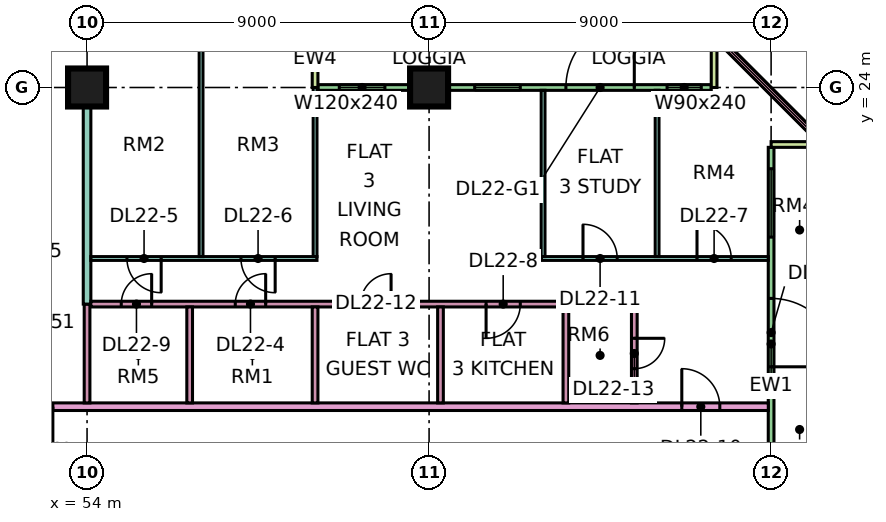
"""IFC4 building model, lengths in metres.
Left out: names, types, materials, properties, quantities, classifications, styles, units other than length and angle.
Written with IfcOpenShell. Run it as: python <this file> out.ifc"""

import sys

from ifc_helpers import new_model, si_unit, direction, frame, frame_2d, origin, origin_2d, place, context, subcontext, project, spatial, rectangle, extrude, element, fill, save


model = new_model("IFC4")
c1 = context("Model", 3, precision=1e-05, world=origin(), true_north=direction((0.0, 1.0)))
c2 = subcontext(c1, "Body", "Model", "MODEL_VIEW")
j1 = project(units=[si_unit("LENGTHUNIT", "METRE"), si_unit("PLANEANGLEUNIT", "RADIAN")], contexts=[c1])
p1 = place(None, origin())
s1 = spatial("IfcSite", under=j1, at=p1, CompositionType="ELEMENT")
p2 = place(p1, origin())
s2 = spatial("IfcBuilding", under=s1, at=p2, CompositionType="ELEMENT")
p3 = place(p2, frame((0.0, 0.0, 99.4)))
s3 = spatial("IfcBuildingStorey", under=s2, at=p3, CompositionType="ELEMENT", Elevation=99.4)
for number, where, z_axis, x_axis in (
    (1, (54.0, 24.0, 0.0), (0.0, 0.0, 1.0), (1.0, 0.0, 0.0)),
    (2, (63.0, 24.0, 0.0), (0.0, 0.0, 1.0), (1.0, 0.0, 0.0)),
):
    element("IfcColumn", number, at=place(p3, frame(where, z_axis=z_axis, x_axis=x_axis)), inside=s3, PredefinedType="COLUMN", context=c2, shape_type="SweptSolid", body=[
        extrude(rectangle(XDim=1.0, YDim=1.0, at=origin_2d()), origin(), (0.0, 0.0, 1.0), 3.75),
    ])
p4 = place(p3, frame((70.425, 24.0, 0.0), z_axis=(0.0, 0.0, 1.0), x_axis=(-1.0, 0.0, 0.0)))
e3 = element("IfcWall", 3, at=p4, inside=s3, PredefinedType="SOLIDWALL", context=c2, shape_type="SweptSolid", body=[
    extrude(rectangle(XDim=10.35, YDim=0.15, at=frame_2d((5.175, 0.0))), origin(), (0.0, 0.0, 1.0), 3.35),
])
p5 = place(p4, frame((0.262, 0.0, 0.45)))
e4 = element("IfcOpeningElement", 4, at=p5, cuts=e3, PredefinedType="OPENING", context=c2, shape_type="SweptSolid", body=[
    extrude(rectangle(XDim=0.9, YDim=2.4, at=frame_2d((0.45, 1.2))), frame((0.0, 0.085, 0.0), z_axis=(0.0, -1.0, 0.0), x_axis=(1.0, 0.0, 0.0)), (0.0, 0.0, 1.0), 0.17),
])
p6 = place(p4, frame((2.025, 0.0, 0.0)))
e5 = element("IfcOpeningElement", 5, at=p6, cuts=e3, PredefinedType="OPENING", context=c2, shape_type="SweptSolid", body=[
    extrude(rectangle(XDim=1.8, YDim=2.4, at=frame_2d((0.9, 1.2))), frame((0.0, 0.085, 0.0), z_axis=(0.0, -1.0, 0.0), x_axis=(1.0, 0.0, 0.0)), (0.0, 0.0, 1.0), 0.17),
])
p7 = place(p4, frame((5.025, 0.0, 0.45)))
e6 = element("IfcOpeningElement", 6, at=p7, cuts=e3, PredefinedType="OPENING", context=c2, shape_type="SweptSolid", body=[
    extrude(rectangle(XDim=1.2, YDim=2.4, at=frame_2d((0.6, 1.2))), frame((0.0, 0.085, 0.0), z_axis=(0.0, -1.0, 0.0), x_axis=(1.0, 0.0, 0.0)), (0.0, 0.0, 1.0), 0.17),
])
p8 = place(p4, frame((8.587, 0.0, 0.45)))
e7 = element("IfcOpeningElement", 7, at=p8, cuts=e3, PredefinedType="OPENING", context=c2, shape_type="SweptSolid", body=[
    extrude(rectangle(XDim=1.2, YDim=2.4, at=frame_2d((0.6, 1.2))), frame((0.0, 0.085, 0.0), z_axis=(0.0, -1.0, 0.0), x_axis=(1.0, 0.0, 0.0)), (0.0, 0.0, 1.0), 0.17),
])
for number, where, z_axis, x_axis in (
    (8, (70.5, 25.5, 0.0), (0.0, 0.0, 1.0), (0.0, -1.0, 0.0)),
    (9, (60.0, 25.5, 0.0), (0.0, 0.0, 1.0), (0.0, -1.0, 0.0)),
):
    element("IfcWall", number, at=place(p3, frame(where, z_axis=z_axis, x_axis=x_axis)), inside=s3, PredefinedType="SOLIDWALL", context=c2, shape_type="SweptSolid", body=[
        extrude(rectangle(XDim=1.5, YDim=0.15, at=frame_2d((0.75, 0.0))), origin(), (0.0, 0.0, 1.0), 3.35),
    ])
p9 = place(p3, frame((72.0, 12.075, 0.0), z_axis=(0.0, 0.0, 1.0), x_axis=(0.0, 1.0, 0.0)))
e10 = element("IfcWall", 10, at=p9, inside=s3, PredefinedType="SOLIDWALL", context=c2, shape_type="SweptSolid", body=[
    extrude(rectangle(XDim=10.35, YDim=0.15, at=frame_2d((5.175, 0.0))), origin(), (0.0, 0.0, 1.0), 3.35),
])
p10 = place(p9, frame((4.575, 0.0, 0.0)))
e11 = element("IfcOpeningElement", 11, at=p10, cuts=e10, PredefinedType="OPENING", context=c2, shape_type="SweptSolid", body=[
    extrude(rectangle(XDim=1.8, YDim=2.4, at=frame_2d((0.9, 1.2))), frame((0.0, 0.085, 0.0), z_axis=(0.0, -1.0, 0.0), x_axis=(1.0, 0.0, 0.0)), (0.0, 0.0, 1.0), 0.17),
])
p11 = place(p9, frame((7.988, 0.0, 0.45)))
e12 = element("IfcOpeningElement", 12, at=p11, cuts=e10, PredefinedType="OPENING", context=c2, shape_type="SweptSolid", body=[
    extrude(rectangle(XDim=1.8, YDim=2.4, at=frame_2d((0.9, 1.2))), frame((0.0, 0.085, 0.0), z_axis=(0.0, -1.0, 0.0), x_axis=(1.0, 0.0, 0.0)), (0.0, 0.0, 1.0), 0.17),
])
p12 = place(p3, frame((73.5, 22.5, 0.0), z_axis=(0.0, 0.0, 1.0), x_axis=(-1.0, 0.0, 0.0)))
e13 = element("IfcWall", 13, at=p12, inside=s3, PredefinedType="SOLIDWALL", context=c2, shape_type="SweptSolid", body=[
    extrude(rectangle(XDim=1.5, YDim=0.15, at=frame_2d((0.75, 0.0))), origin(), (0.0, 0.0, 1.0), 3.35),
])
p13 = place(p3, frame((73.447, 22.447, 0.0), z_axis=(0.0, 0.0, 1.0), x_axis=(-0.707106781187, 0.707106781187, 0.0)))
e14 = element("IfcWall", 14, at=p13, inside=s3, PredefinedType="SOLIDWALL", context=c2, shape_type="SweptSolid", body=[
    extrude(rectangle(XDim=4.243, YDim=0.15, at=frame_2d((2.121, 0.0))), origin(), (0.0, 0.0, 1.0), 3.35),
])
p14 = place(p13, frame((0.621, 0.0, 0.45)))
e15 = element("IfcOpeningElement", 15, at=p14, cuts=e14, PredefinedType="OPENING", context=c2, shape_type="SweptSolid", body=[
    extrude(rectangle(XDim=3.0, YDim=2.4, at=frame_2d((1.5, 1.2))), frame((0.0, 0.085, 0.0), z_axis=(0.0, -1.0, 0.0), x_axis=(1.0, 0.0, 0.0)), (0.0, 0.0, 1.0), 0.17),
])
p15 = place(p3, frame((51.225, 15.6, 0.0), z_axis=(0.0, 0.0, 1.0), x_axis=(1.0, 0.0, 0.0)))
e16 = element("IfcWall", 16, at=p15, inside=s3, PredefinedType="PARTITIONING", context=c2, shape_type="SweptSolid", body=[
    extrude(rectangle(XDim=20.701, YDim=0.2, at=frame_2d((10.351, 0.0))), origin(), (0.0, 0.0, 1.0), 3.35),
])
p16 = place(p15, frame((18.425, 0.0, 0.0)))
e17 = element("IfcOpeningElement", 17, at=p16, cuts=e16, PredefinedType="OPENING", context=c2, shape_type="SweptSolid", body=[
    extrude(rectangle(XDim=1.0, YDim=2.1, at=frame_2d((0.5, 1.05))), frame((0.0, 0.11, 0.0), z_axis=(0.0, -1.0, 0.0), x_axis=(1.0, 0.0, 0.0)), (0.0, 0.0, 1.0), 0.22),
])
p17 = place(p15, frame((0.875, 0.0, 0.0)))
e18 = element("IfcOpeningElement", 18, at=p17, cuts=e16, PredefinedType="OPENING", context=c2, shape_type="SweptSolid", body=[
    extrude(rectangle(XDim=1.0, YDim=2.1, at=frame_2d((0.5, 1.05))), frame((0.0, 0.11, 0.0), z_axis=(0.0, -1.0, 0.0), x_axis=(1.0, 0.0, 0.0)), (0.0, 0.0, 1.0), 0.22),
])
p18 = place(p3, frame((54.0, 15.7, 0.0), z_axis=(0.0, 0.0, 1.0), x_axis=(0.0, 1.0, 0.0)))
e19 = element("IfcWall", 19, at=p18, inside=s3, PredefinedType="PARTITIONING", context=c2, shape_type="SweptSolid", body=[
    extrude(rectangle(XDim=2.6, YDim=0.15, at=frame_2d((1.3, 0.0))), origin(), (0.0, 0.0, 1.0), 3.35),
])
p19 = place(p3, frame((54.0, 18.3, 0.0), z_axis=(0.0, 0.0, 1.0), x_axis=(0.0, 1.0, 0.0)))
e20 = element("IfcWall", 20, at=p19, inside=s3, PredefinedType="PARTITIONING", context=c2, shape_type="SweptSolid", body=[
    extrude(rectangle(XDim=5.7, YDim=0.2, at=frame_2d((2.85, 0.0))), origin(), (0.0, 0.0, 1.0), 3.35),
])
p20 = place(p3, frame((54.1, 18.3, 0.0), z_axis=(0.0, 0.0, 1.0), x_axis=(1.0, 0.0, 0.0)))
e21 = element("IfcWall", 21, at=p20, inside=s3, PredefinedType="PARTITIONING", context=c2, shape_type="SweptSolid", body=[
    extrude(rectangle(XDim=14.375, YDim=0.15, at=frame_2d((7.188, 0.0))), origin(), (0.0, 0.0, 1.0), 3.35),
])
p21 = place(p20, frame((3.8, 0.0, 0.0)))
e22 = element("IfcOpeningElement", 22, at=p21, cuts=e21, PredefinedType="OPENING", context=c2, shape_type="SweptSolid", body=[
    extrude(rectangle(XDim=0.8, YDim=2.1, at=frame_2d((0.4, 1.05))), frame((0.0, 0.085, 0.0), z_axis=(0.0, -1.0, 0.0), x_axis=(1.0, 0.0, 0.0)), (0.0, 0.0, 1.0), 0.17),
])
p22 = place(p20, frame((10.4, 0.0, 0.0)))
e23 = element("IfcOpeningElement", 23, at=p22, cuts=e21, PredefinedType="OPENING", context=c2, shape_type="SweptSolid", body=[
    extrude(rectangle(XDim=0.9, YDim=2.1, at=frame_2d((0.45, 1.05))), frame((0.0, 0.085, 0.0), z_axis=(0.0, -1.0, 0.0), x_axis=(1.0, 0.0, 0.0)), (0.0, 0.0, 1.0), 0.17),
])
p23 = place(p20, frame((0.8, 0.0, 0.0)))
e24 = element("IfcOpeningElement", 24, at=p23, cuts=e21, PredefinedType="OPENING", context=c2, shape_type="SweptSolid", body=[
    extrude(rectangle(XDim=0.8, YDim=2.1, at=frame_2d((0.4, 1.05))), frame((0.0, 0.085, 0.0), z_axis=(0.0, -1.0, 0.0), x_axis=(1.0, 0.0, 0.0)), (0.0, 0.0, 1.0), 0.17),
])
p24 = place(p20, frame((7.1, 0.0, 0.0)))
e25 = element("IfcOpeningElement", 25, at=p24, cuts=e21, PredefinedType="OPENING", context=c2, shape_type="SweptSolid", body=[
    extrude(rectangle(XDim=0.8, YDim=2.1, at=frame_2d((0.4, 1.05))), frame((0.0, 0.085, 0.0), z_axis=(0.0, -1.0, 0.0), x_axis=(1.0, 0.0, 0.0)), (0.0, 0.0, 1.0), 0.17),
])
p25 = place(p3, frame((54.1, 19.5, 0.0), z_axis=(0.0, 0.0, 1.0), x_axis=(1.0, 0.0, 0.0)))
e26 = element("IfcWall", 26, at=p25, inside=s3, PredefinedType="PARTITIONING", context=c2, shape_type="SweptSolid", body=[
    extrude(rectangle(XDim=5.95, YDim=0.1, at=frame_2d((2.975, 0.0))), origin(), (0.0, 0.0, 1.0), 3.35),
])
p26 = place(p25, frame((0.95, 0.0, 0.0)))
e27 = element("IfcOpeningElement", 27, at=p26, cuts=e26, PredefinedType="OPENING", context=c2, shape_type="SweptSolid", body=[
    extrude(rectangle(XDim=0.9, YDim=2.1, at=frame_2d((0.45, 1.05))), frame((0.0, 0.06, 0.0), z_axis=(0.0, -1.0, 0.0), x_axis=(1.0, 0.0, 0.0)), (0.0, 0.0, 1.0), 0.12),
])
p27 = place(p25, frame((3.95, 0.0, 0.0)))
e28 = element("IfcOpeningElement", 28, at=p27, cuts=e26, PredefinedType="OPENING", context=c2, shape_type="SweptSolid", body=[
    extrude(rectangle(XDim=0.9, YDim=2.1, at=frame_2d((0.45, 1.05))), frame((0.0, 0.06, 0.0), z_axis=(0.0, -1.0, 0.0), x_axis=(1.0, 0.0, 0.0)), (0.0, 0.0, 1.0), 0.12),
])
p28 = place(p3, frame((56.7, 15.7, 0.0), z_axis=(0.0, 0.0, 1.0), x_axis=(0.0, 1.0, 0.0)))
e29 = element("IfcWall", 29, at=p28, inside=s3, PredefinedType="PARTITIONING", context=c2, shape_type="SweptSolid", body=[
    extrude(rectangle(XDim=2.525, YDim=0.15, at=frame_2d((1.263, 0.0))), origin(), (0.0, 0.0, 1.0), 3.35),
])
p29 = place(p3, frame((57.0, 19.55, 0.0), z_axis=(0.0, 0.0, 1.0), x_axis=(0.0, 1.0, 0.0)))
e30 = element("IfcWall", 30, at=p29, inside=s3, PredefinedType="PARTITIONING", context=c2, shape_type="SweptSolid", body=[
    extrude(rectangle(XDim=5.801, YDim=0.1, at=frame_2d((2.9, 0.0))), origin(), (0.0, 0.0, 1.0), 3.35),
])
p30 = place(p3, frame((60.0, 15.7, 0.0), z_axis=(0.0, 0.0, 1.0), x_axis=(0.0, 1.0, 0.0)))
e31 = element("IfcWall", 31, at=p30, inside=s3, PredefinedType="PARTITIONING", context=c2, shape_type="SweptSolid", body=[
    extrude(rectangle(XDim=2.525, YDim=0.15, at=frame_2d((1.263, 0.0))), origin(), (0.0, 0.0, 1.0), 3.35),
])
p31 = place(p3, frame((60.0, 19.55, 0.0), z_axis=(0.0, 0.0, 1.0), x_axis=(0.0, 1.0, 0.0)))
e32 = element("IfcWall", 32, at=p31, inside=s3, PredefinedType="PARTITIONING", context=c2, shape_type="SweptSolid", body=[
    extrude(rectangle(XDim=4.45, YDim=0.1, at=frame_2d((2.225, 0.0))), origin(), (0.0, 0.0, 1.0), 3.35),
])
p32 = place(p3, frame((63.3, 15.7, 0.0), z_axis=(0.0, 0.0, 1.0), x_axis=(0.0, 1.0, 0.0)))
e33 = element("IfcWall", 33, at=p32, inside=s3, PredefinedType="PARTITIONING", context=c2, shape_type="SweptSolid", body=[
    extrude(rectangle(XDim=2.525, YDim=0.15, at=frame_2d((1.263, 0.0))), origin(), (0.0, 0.0, 1.0), 3.35),
])
p33 = place(p3, frame((65.95, 19.5, 0.0), z_axis=(0.0, 0.0, 1.0), x_axis=(1.0, 0.0, 0.0)))
e34 = element("IfcWall", 34, at=p33, inside=s3, PredefinedType="PARTITIONING", context=c2, shape_type="SweptSolid", body=[
    extrude(rectangle(XDim=5.976, YDim=0.1, at=frame_2d((2.988, 0.0))), origin(), (0.0, 0.0, 1.0), 3.35),
])
p34 = place(p33, frame((4.1, 0.0, 0.0)))
e35 = element("IfcOpeningElement", 35, at=p34, cuts=e34, PredefinedType="OPENING", context=c2, shape_type="SweptSolid", body=[
    extrude(rectangle(XDim=0.9, YDim=2.1, at=frame_2d((0.45, 1.05))), frame((0.0, 0.06, 0.0), z_axis=(0.0, -1.0, 0.0), x_axis=(1.0, 0.0, 0.0)), (0.0, 0.0, 1.0), 0.12),
])
p35 = place(p33, frame((1.1, 0.0, 0.0)))
e36 = element("IfcOpeningElement", 36, at=p35, cuts=e34, PredefinedType="OPENING", context=c2, shape_type="SweptSolid", body=[
    extrude(rectangle(XDim=0.9, YDim=2.1, at=frame_2d((0.45, 1.05))), frame((0.0, 0.06, 0.0), z_axis=(0.0, -1.0, 0.0), x_axis=(1.0, 0.0, 0.0)), (0.0, 0.0, 1.0), 0.12),
])
p36 = place(p3, frame((66.0, 19.55, 0.0), z_axis=(0.0, 0.0, 1.0), x_axis=(0.0, 1.0, 0.0)))
e37 = element("IfcWall", 37, at=p36, inside=s3, PredefinedType="PARTITIONING", context=c2, shape_type="SweptSolid", body=[
    extrude(rectangle(XDim=4.376, YDim=0.1, at=frame_2d((2.188, 0.0))), origin(), (0.0, 0.0, 1.0), 3.35),
])
p37 = place(p3, frame((66.6, 15.7, 0.0), z_axis=(0.0, 0.0, 1.0), x_axis=(0.0, 1.0, 0.0)))
e38 = element("IfcWall", 38, at=p37, inside=s3, PredefinedType="PARTITIONING", context=c2, shape_type="SweptSolid", body=[
    extrude(rectangle(XDim=2.525, YDim=0.15, at=frame_2d((1.263, 0.0))), origin(), (0.0, 0.0, 1.0), 3.35),
])
p38 = place(p3, frame((68.4, 15.7, 0.0), z_axis=(0.0, 0.0, 1.0), x_axis=(0.0, 1.0, 0.0)))
e39 = element("IfcWall", 39, at=p38, inside=s3, PredefinedType="PARTITIONING", context=c2, shape_type="SweptSolid", body=[
    extrude(rectangle(XDim=2.525, YDim=0.15, at=frame_2d((1.263, 0.0))), origin(), (0.0, 0.0, 1.0), 3.35),
])
p39 = place(p38, frame((0.9, 0.0, 0.0)))
e40 = element("IfcOpeningElement", 40, at=p39, cuts=e39, PredefinedType="OPENING", context=c2, shape_type="SweptSolid", body=[
    extrude(rectangle(XDim=0.8, YDim=2.1, at=frame_2d((0.4, 1.05))), frame((0.0, 0.085, 0.0), z_axis=(0.0, -1.0, 0.0), x_axis=(1.0, 0.0, 0.0)), (0.0, 0.0, 1.0), 0.17),
])
p40 = place(p3, frame((69.0, 19.55, 0.0), z_axis=(0.0, 0.0, 1.0), x_axis=(0.0, 1.0, 0.0)))
e41 = element("IfcWall", 41, at=p40, inside=s3, PredefinedType="PARTITIONING", context=c2, shape_type="SweptSolid", body=[
    extrude(rectangle(XDim=4.376, YDim=0.1, at=frame_2d((2.188, 0.0))), origin(), (0.0, 0.0, 1.0), 3.35),
])
p41 = place(p5, origin())
e42 = element("IfcWindow", 42, at=p41, inside=s3, PartitioningType="SINGLE_PANEL", PredefinedType="WINDOW", context=c2, shape_type="SweptSolid", body=[
    extrude(rectangle(XDim=0.9, YDim=2.4, at=frame_2d((0.45, 1.2))), frame((0.0, 0.03, 0.0), z_axis=(0.0, -1.0, 0.0), x_axis=(1.0, 0.0, 0.0)), (0.0, 0.0, 1.0), 0.06),
])
fill(e4, e42)
p42 = place(p6, frame((1.8, 0.0, 0.0), z_axis=(0.0, 0.0, 1.0), x_axis=(-1.0, 0.0, 0.0)))
e43 = element("IfcDoor", 43, at=p42, inside=s3, OperationType="DOUBLE_DOOR_SINGLE_SWING", PredefinedType="DOOR", context=c2, shape_type="SweptSolid", body=[
    extrude(rectangle(XDim=1.8, YDim=2.4, at=frame_2d((0.9, 1.2))), frame((0.0, 0.025, 0.0), z_axis=(0.0, -1.0, 0.0), x_axis=(1.0, 0.0, 0.0)), (0.0, 0.0, 1.0), 0.05),
])
fill(e5, e43)
p43 = place(p7, origin())
e44 = element("IfcWindow", 44, at=p43, inside=s3, PartitioningType="SINGLE_PANEL", PredefinedType="WINDOW", context=c2, shape_type="SweptSolid", body=[
    extrude(rectangle(XDim=1.2, YDim=2.4, at=frame_2d((0.6, 1.2))), frame((0.0, 0.03, 0.0), z_axis=(0.0, -1.0, 0.0), x_axis=(1.0, 0.0, 0.0)), (0.0, 0.0, 1.0), 0.06),
])
fill(e6, e44)
p44 = place(p8, origin())
e45 = element("IfcWindow", 45, at=p44, inside=s3, PartitioningType="SINGLE_PANEL", PredefinedType="WINDOW", context=c2, shape_type="SweptSolid", body=[
    extrude(rectangle(XDim=1.2, YDim=2.4, at=frame_2d((0.6, 1.2))), frame((0.0, 0.03, 0.0), z_axis=(0.0, -1.0, 0.0), x_axis=(1.0, 0.0, 0.0)), (0.0, 0.0, 1.0), 0.06),
])
fill(e7, e45)
p45 = place(p10, frame((1.8, 0.0, 0.0), z_axis=(0.0, 0.0, 1.0), x_axis=(-1.0, 0.0, 0.0)))
e46 = element("IfcDoor", 46, at=p45, inside=s3, OperationType="DOUBLE_DOOR_SINGLE_SWING", PredefinedType="DOOR", context=c2, shape_type="SweptSolid", body=[
    extrude(rectangle(XDim=1.8, YDim=2.4, at=frame_2d((0.9, 1.2))), frame((0.0, 0.025, 0.0), z_axis=(0.0, -1.0, 0.0), x_axis=(1.0, 0.0, 0.0)), (0.0, 0.0, 1.0), 0.05),
])
fill(e11, e46)
p46 = place(p11, origin())
e47 = element("IfcWindow", 47, at=p46, inside=s3, PartitioningType="SINGLE_PANEL", PredefinedType="WINDOW", context=c2, shape_type="SweptSolid", body=[
    extrude(rectangle(XDim=1.8, YDim=2.4, at=frame_2d((0.9, 1.2))), frame((0.0, 0.03, 0.0), z_axis=(0.0, -1.0, 0.0), x_axis=(1.0, 0.0, 0.0)), (0.0, 0.0, 1.0), 0.06),
])
fill(e12, e47)
p47 = place(p14, origin())
e48 = element("IfcWindow", 48, at=p47, inside=s3, PartitioningType="SINGLE_PANEL", PredefinedType="WINDOW", context=c2, shape_type="SweptSolid", body=[
    extrude(rectangle(XDim=3.0, YDim=2.4, at=frame_2d((1.5, 1.2))), frame((0.0, 0.03, 0.0), z_axis=(0.0, -1.0, 0.0), x_axis=(1.0, 0.0, 0.0)), (0.0, 0.0, 1.0), 0.06),
])
fill(e15, e48)
p48 = place(p21, frame((0.8, 0.0, 0.0), z_axis=(0.0, 0.0, 1.0), x_axis=(-1.0, 0.0, 0.0)))
e49 = element("IfcDoor", 49, at=p48, inside=s3, OperationType="SINGLE_SWING_RIGHT", PredefinedType="DOOR", context=c2, shape_type="SweptSolid", body=[
    extrude(rectangle(XDim=0.8, YDim=2.1, at=frame_2d((0.4, 1.05))), frame((0.0, 0.025, 0.0), z_axis=(0.0, -1.0, 0.0), x_axis=(1.0, 0.0, 0.0)), (0.0, 0.0, 1.0), 0.05),
])
fill(e22, e49)
p49 = place(p26, origin())
e50 = element("IfcDoor", 50, at=p49, inside=s3, OperationType="SINGLE_SWING_RIGHT", PredefinedType="DOOR", context=c2, shape_type="SweptSolid", body=[
    extrude(rectangle(XDim=0.9, YDim=2.1, at=frame_2d((0.45, 1.05))), frame((0.0, 0.025, 0.0), z_axis=(0.0, -1.0, 0.0), x_axis=(1.0, 0.0, 0.0)), (0.0, 0.0, 1.0), 0.05),
])
fill(e27, e50)
p50 = place(p27, origin())
e51 = element("IfcDoor", 51, at=p50, inside=s3, OperationType="SINGLE_SWING_RIGHT", PredefinedType="DOOR", context=c2, shape_type="SweptSolid", body=[
    extrude(rectangle(XDim=0.9, YDim=2.1, at=frame_2d((0.45, 1.05))), frame((0.0, 0.025, 0.0), z_axis=(0.0, -1.0, 0.0), x_axis=(1.0, 0.0, 0.0)), (0.0, 0.0, 1.0), 0.05),
])
fill(e28, e51)
p51 = place(p34, origin())
e52 = element("IfcDoor", 52, at=p51, inside=s3, OperationType="SINGLE_SWING_LEFT", PredefinedType="DOOR", context=c2, shape_type="SweptSolid", body=[
    extrude(rectangle(XDim=0.9, YDim=2.1, at=frame_2d((0.45, 1.05))), frame((0.0, 0.025, 0.0), z_axis=(0.0, -1.0, 0.0), x_axis=(1.0, 0.0, 0.0)), (0.0, 0.0, 1.0), 0.05),
])
fill(e35, e52)
p52 = place(p22, frame((0.9, 0.0, 0.0), z_axis=(0.0, 0.0, 1.0), x_axis=(-1.0, 0.0, 0.0)))
e53 = element("IfcDoor", 53, at=p52, inside=s3, OperationType="SINGLE_SWING_LEFT", PredefinedType="DOOR", context=c2, shape_type="SweptSolid", body=[
    extrude(rectangle(XDim=0.9, YDim=2.1, at=frame_2d((0.45, 1.05))), frame((0.0, 0.025, 0.0), z_axis=(0.0, -1.0, 0.0), x_axis=(1.0, 0.0, 0.0)), (0.0, 0.0, 1.0), 0.05),
])
fill(e23, e53)
p53 = place(p23, frame((0.8, 0.0, 0.0), z_axis=(0.0, 0.0, 1.0), x_axis=(-1.0, 0.0, 0.0)))
e54 = element("IfcDoor", 54, at=p53, inside=s3, OperationType="SINGLE_SWING_RIGHT", PredefinedType="DOOR", context=c2, shape_type="SweptSolid", body=[
    extrude(rectangle(XDim=0.8, YDim=2.1, at=frame_2d((0.4, 1.05))), frame((0.0, 0.025, 0.0), z_axis=(0.0, -1.0, 0.0), x_axis=(1.0, 0.0, 0.0)), (0.0, 0.0, 1.0), 0.05),
])
fill(e24, e54)
p54 = place(p16, origin())
e55 = element("IfcDoor", 55, at=p54, inside=s3, OperationType="SINGLE_SWING_LEFT", PredefinedType="DOOR", context=c2, shape_type="SweptSolid", body=[
    extrude(rectangle(XDim=1.0, YDim=2.1, at=frame_2d((0.5, 1.05))), frame((0.0, 0.025, 0.0), z_axis=(0.0, -1.0, 0.0), x_axis=(1.0, 0.0, 0.0)), (0.0, 0.0, 1.0), 0.05),
])
fill(e17, e55)
p55 = place(p35, origin())
e56 = element("IfcDoor", 56, at=p55, inside=s3, OperationType="SINGLE_SWING_LEFT", PredefinedType="DOOR", context=c2, shape_type="SweptSolid", body=[
    extrude(rectangle(XDim=0.9, YDim=2.1, at=frame_2d((0.45, 1.05))), frame((0.0, 0.025, 0.0), z_axis=(0.0, -1.0, 0.0), x_axis=(1.0, 0.0, 0.0)), (0.0, 0.0, 1.0), 0.05),
])
fill(e36, e56)
p56 = place(p24, frame((0.8, 0.0, 0.0), z_axis=(0.0, 0.0, 1.0), x_axis=(-1.0, 0.0, 0.0)))
e57 = element("IfcDoor", 57, at=p56, inside=s3, OperationType="SINGLE_SWING_RIGHT", PredefinedType="DOOR", context=c2, shape_type="SweptSolid", body=[
    extrude(rectangle(XDim=0.8, YDim=2.1, at=frame_2d((0.4, 1.05))), frame((0.0, 0.025, 0.0), z_axis=(0.0, -1.0, 0.0), x_axis=(1.0, 0.0, 0.0)), (0.0, 0.0, 1.0), 0.05),
])
fill(e25, e57)
p57 = place(p39, origin())
e58 = element("IfcDoor", 58, at=p57, inside=s3, OperationType="SINGLE_SWING_RIGHT", PredefinedType="DOOR", context=c2, shape_type="SweptSolid", body=[
    extrude(rectangle(XDim=0.8, YDim=2.1, at=frame_2d((0.4, 1.05))), frame((0.0, 0.025, 0.0), z_axis=(0.0, -1.0, 0.0), x_axis=(1.0, 0.0, 0.0)), (0.0, 0.0, 1.0), 0.05),
])
fill(e40, e58)
p58 = place(p17, origin())
e59 = element("IfcDoor", 59, at=p58, inside=s3, OperationType="SINGLE_SWING_RIGHT", PredefinedType="DOOR", context=c2, shape_type="SweptSolid", body=[
    extrude(rectangle(XDim=1.0, YDim=2.1, at=frame_2d((0.5, 1.05))), frame((0.0, 0.025, 0.0), z_axis=(0.0, -1.0, 0.0), x_axis=(1.0, 0.0, 0.0)), (0.0, 0.0, 1.0), 0.05),
])
fill(e18, e59)
save(model, sys.argv[1])
